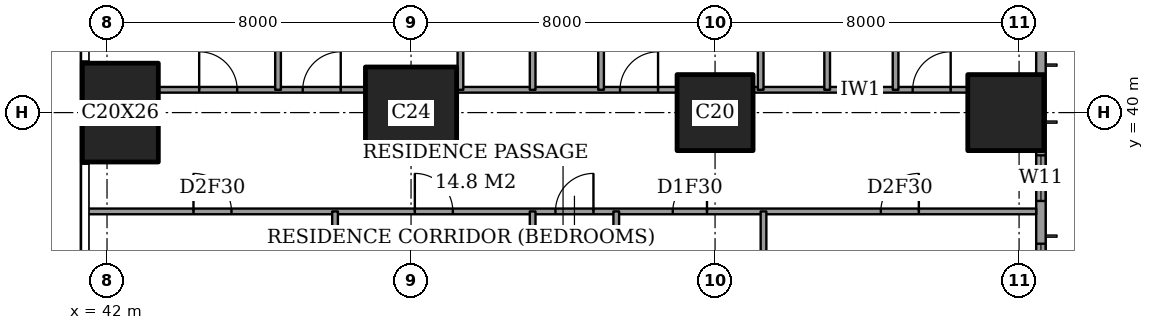
"""IFC4 building model, lengths in metres.
Left out: names, types, materials, properties, quantities, classifications, styles, units other than length and angle.
Written with IfcOpenShell. Run it as: python <this file> out.ifc"""

import sys

from ifc_helpers import new_model, si_unit, direction, frame, frame_2d, origin, origin_2d, place, context, subcontext, project, spatial, rectangle, extrude, element, fill, save


model = new_model("IFC4")
c1 = context("Model", 3, precision=1e-05, world=origin(), true_north=direction((0.0, 1.0)))
c2 = subcontext(c1, "Body", "Model", "MODEL_VIEW")
j1 = project(units=[si_unit("LENGTHUNIT", "METRE"), si_unit("PLANEANGLEUNIT", "RADIAN")], contexts=[c1])
p1 = place(None, origin())
s1 = spatial("IfcSite", under=j1, at=p1, CompositionType="ELEMENT")
p2 = place(p1, origin())
s2 = spatial("IfcBuilding", under=s1, at=p2, CompositionType="ELEMENT")
p3 = place(p2, frame((0.0, 0.0, 135.8)))
s3 = spatial("IfcBuildingStorey", under=s2, at=p3, CompositionType="ELEMENT", Elevation=135.8)
p4 = place(p3, frame((42.35, 40.0, 0.0), z_axis=(0.0, 0.0, 1.0), x_axis=(1.0, 0.0, 0.0)))
e1 = element("IfcColumn", 1, at=p4, inside=s3, PredefinedType="COLUMN", context=c2, shape_type="SweptSolid", body=[
    extrude(rectangle(XDim=2.0, YDim=2.6, at=origin_2d()), origin(), (0.0, 0.0, 1.0), 3.6),
])
p5 = place(p3, frame((50.0, 40.0, 0.0), z_axis=(0.0, 0.0, 1.0), x_axis=(1.0, 0.0, 0.0)))
e2 = element("IfcColumn", 2, at=p5, inside=s3, PredefinedType="COLUMN", context=c2, shape_type="SweptSolid", body=[
    extrude(rectangle(XDim=2.4, YDim=2.4, at=origin_2d()), origin(), (0.0, 0.0, 1.0), 3.6),
])
for number, where, z_axis, x_axis in (
    (3, (58.0, 40.0, 0.0), (0.0, 0.0, 1.0), (1.0, 0.0, 0.0)),
    (4, (65.65, 40.0, 0.0), (0.0, 0.0, 1.0), (1.0, 0.0, 0.0)),
):
    element("IfcColumn", number, at=place(p3, frame(where, z_axis=z_axis, x_axis=x_axis)), inside=s3, PredefinedType="COLUMN", context=c2, shape_type="SweptSolid", body=[
        extrude(rectangle(XDim=2.0, YDim=2.0, at=origin_2d()), origin(), (0.0, 0.0, 1.0), 3.6),
    ])
p6 = place(p3, frame((66.575, 3.175, 0.0), z_axis=(0.0, 0.0, 1.0), x_axis=(0.0, 1.0, 0.0)))
e5 = element("IfcWall", 5, at=p6, inside=s3, PredefinedType="SOLIDWALL", context=c2, shape_type="SweptSolid", body=[
    extrude(rectangle(XDim=41.65, YDim=0.25, at=frame_2d((20.825, 0.0))), origin(), (0.0, 0.0, 1.0), 3.6),
])
p7 = place(p6, frame((0.775, 0.0, 0.4)))
e6 = element("IfcOpeningElement", 6, at=p7, cuts=e5, PredefinedType="OPENING", context=c2, shape_type="SweptSolid", body=[
    extrude(rectangle(XDim=2.4, YDim=2.2, at=frame_2d((1.2, 1.1))), frame((0.0, 0.135, 0.0), z_axis=(0.0, -1.0, 0.0), x_axis=(1.0, 0.0, 0.0)), (0.0, 0.0, 1.0), 0.27),
])
p8 = place(p6, frame((6.1, 0.0, 0.4)))
e7 = element("IfcOpeningElement", 7, at=p8, cuts=e5, PredefinedType="OPENING", context=c2, shape_type="SweptSolid", body=[
    extrude(rectangle(XDim=1.2, YDim=2.2, at=frame_2d((0.6, 1.1))), frame((0.0, 0.135, 0.0), z_axis=(0.0, -1.0, 0.0), x_axis=(1.0, 0.0, 0.0)), (0.0, 0.0, 1.0), 0.27),
])
p9 = place(p6, frame((8.275, 0.0, 0.4)))
e8 = element("IfcOpeningElement", 8, at=p9, cuts=e5, PredefinedType="OPENING", context=c2, shape_type="SweptSolid", body=[
    extrude(rectangle(XDim=2.4, YDim=2.2, at=frame_2d((1.2, 1.1))), frame((0.0, 0.135, 0.0), z_axis=(0.0, -1.0, 0.0), x_axis=(1.0, 0.0, 0.0)), (0.0, 0.0, 1.0), 0.27),
])
p10 = place(p6, frame((15.775, 0.0, 0.4)))
e9 = element("IfcOpeningElement", 9, at=p10, cuts=e5, PredefinedType="OPENING", context=c2, shape_type="SweptSolid", body=[
    extrude(rectangle(XDim=2.4, YDim=2.2, at=frame_2d((1.2, 1.1))), frame((0.0, 0.135, 0.0), z_axis=(0.0, -1.0, 0.0), x_axis=(1.0, 0.0, 0.0)), (0.0, 0.0, 1.0), 0.27),
])
p11 = place(p6, frame((23.475, 0.0, 0.4)))
e10 = element("IfcOpeningElement", 10, at=p11, cuts=e5, PredefinedType="OPENING", context=c2, shape_type="SweptSolid", body=[
    extrude(rectangle(XDim=2.4, YDim=2.2, at=frame_2d((1.2, 1.1))), frame((0.0, 0.135, 0.0), z_axis=(0.0, -1.0, 0.0), x_axis=(1.0, 0.0, 0.0)), (0.0, 0.0, 1.0), 0.27),
])
p12 = place(p6, frame((30.975, 0.0, 0.4)))
e11 = element("IfcOpeningElement", 11, at=p12, cuts=e5, PredefinedType="OPENING", context=c2, shape_type="SweptSolid", body=[
    extrude(rectangle(XDim=2.4, YDim=2.2, at=frame_2d((1.2, 1.1))), frame((0.0, 0.135, 0.0), z_axis=(0.0, -1.0, 0.0), x_axis=(1.0, 0.0, 0.0)), (0.0, 0.0, 1.0), 0.27),
])
p13 = place(p6, frame((34.5, 0.0, 0.4)))
e12 = element("IfcOpeningElement", 12, at=p13, cuts=e5, PredefinedType="OPENING", context=c2, shape_type="SweptSolid", body=[
    extrude(rectangle(XDim=1.2, YDim=2.2, at=frame_2d((0.6, 1.1))), frame((0.0, 0.135, 0.0), z_axis=(0.0, -1.0, 0.0), x_axis=(1.0, 0.0, 0.0)), (0.0, 0.0, 1.0), 0.27),
])
p14 = place(p6, frame((38.475, 0.0, 0.4)))
e13 = element("IfcOpeningElement", 13, at=p14, cuts=e5, PredefinedType="OPENING", context=c2, shape_type="SweptSolid", body=[
    extrude(rectangle(XDim=2.4, YDim=2.2, at=frame_2d((1.2, 1.1))), frame((0.0, 0.135, 0.0), z_axis=(0.0, -1.0, 0.0), x_axis=(1.0, 0.0, 0.0)), (0.0, 0.0, 1.0), 0.27),
])
p15 = place(p3, frame((41.439, 37.4, 0.0), z_axis=(0.0, 0.0, 1.0), x_axis=(1.0, 0.0, 0.0)))
e14 = element("IfcWall", 14, at=p15, inside=s3, PredefinedType="PARTITIONING", context=c2, shape_type="SweptSolid", body=[
    extrude(rectangle(XDim=25.011, YDim=0.15, at=frame_2d((12.505, 0.0))), origin(), (0.0, 0.0, 1.0), 3.35),
])
p16 = place(p15, frame((12.361, 0.0, 0.0)))
e15 = element("IfcOpeningElement", 15, at=p16, cuts=e14, PredefinedType="OPENING", context=c2, shape_type="SweptSolid", body=[
    extrude(rectangle(XDim=1.0, YDim=2.1, at=frame_2d((0.5, 1.05))), frame((0.0, 0.085, 0.0), z_axis=(0.0, -1.0, 0.0), x_axis=(1.0, 0.0, 0.0)), (0.0, 0.0, 1.0), 0.17),
])
p17 = place(p15, frame((20.924, 0.0, 0.0)))
e16 = element("IfcOpeningElement", 16, at=p17, cuts=e14, PredefinedType="OPENING", context=c2, shape_type="SweptSolid", body=[
    extrude(rectangle(XDim=1.0, YDim=2.1, at=frame_2d((0.5, 1.05))), frame((0.0, 0.085, 0.0), z_axis=(0.0, -1.0, 0.0), x_axis=(1.0, 0.0, 0.0)), (0.0, 0.0, 1.0), 0.17),
])
p18 = place(p15, frame((15.448, 0.0, 0.0)))
e17 = element("IfcOpeningElement", 17, at=p18, cuts=e14, PredefinedType="OPENING", context=c2, shape_type="SweptSolid", body=[
    extrude(rectangle(XDim=0.9, YDim=2.1, at=frame_2d((0.45, 1.05))), frame((0.0, 0.085, 0.0), z_axis=(0.0, -1.0, 0.0), x_axis=(1.0, 0.0, 0.0)), (0.0, 0.0, 1.0), 0.17),
])
p19 = place(p15, frame((8.661, 0.0, 0.0)))
e18 = element("IfcOpeningElement", 18, at=p19, cuts=e14, PredefinedType="OPENING", context=c2, shape_type="SweptSolid", body=[
    extrude(rectangle(XDim=1.0, YDim=2.1, at=frame_2d((0.5, 1.05))), frame((0.0, 0.085, 0.0), z_axis=(0.0, -1.0, 0.0), x_axis=(1.0, 0.0, 0.0)), (0.0, 0.0, 1.0), 0.17),
])
p20 = place(p15, frame((2.836, 0.0, 0.0)))
e19 = element("IfcOpeningElement", 19, at=p20, cuts=e14, PredefinedType="OPENING", context=c2, shape_type="SweptSolid", body=[
    extrude(rectangle(XDim=1.0, YDim=2.1, at=frame_2d((0.5, 1.05))), frame((0.0, 0.085, 0.0), z_axis=(0.0, -1.0, 0.0), x_axis=(1.0, 0.0, 0.0)), (0.0, 0.0, 1.0), 0.17),
])
p21 = place(p3, frame((43.35, 40.6, 0.0), z_axis=(0.0, 0.0, 1.0), x_axis=(1.0, 0.0, 0.0)))
e20 = element("IfcWall", 20, at=p21, inside=s3, PredefinedType="PARTITIONING", context=c2, shape_type="SweptSolid", body=[
    extrude(rectangle(XDim=5.45, YDim=0.15, at=frame_2d((2.725, 0.0))), origin(), (0.0, 0.0, 1.0), 3.35),
])
p22 = place(p21, frame((3.8, 0.0, 0.0)))
e21 = element("IfcOpeningElement", 21, at=p22, cuts=e20, PredefinedType="OPENING", context=c2, shape_type="SweptSolid", body=[
    extrude(rectangle(XDim=1.0, YDim=2.1, at=frame_2d((0.5, 1.05))), frame((0.0, 0.085, 0.0), z_axis=(0.0, -1.0, 0.0), x_axis=(1.0, 0.0, 0.0)), (0.0, 0.0, 1.0), 0.17),
])
p23 = place(p21, frame((1.075, 0.0, 0.0)))
e22 = element("IfcOpeningElement", 22, at=p23, cuts=e20, PredefinedType="OPENING", context=c2, shape_type="SweptSolid", body=[
    extrude(rectangle(XDim=1.0, YDim=2.1, at=frame_2d((0.5, 1.05))), frame((0.0, 0.085, 0.0), z_axis=(0.0, -1.0, 0.0), x_axis=(1.0, 0.0, 0.0)), (0.0, 0.0, 1.0), 0.17),
])
p24 = place(p3, frame((51.2, 40.6, 0.0), z_axis=(0.0, 0.0, 1.0), x_axis=(1.0, 0.0, 0.0)))
e23 = element("IfcWall", 23, at=p24, inside=s3, PredefinedType="PARTITIONING", context=c2, shape_type="SweptSolid", body=[
    extrude(rectangle(XDim=5.8, YDim=0.15, at=frame_2d((2.9, 0.0))), origin(), (0.0, 0.0, 1.0), 3.35),
])
p25 = place(p24, frame((4.3, 0.0, 0.0)))
e24 = element("IfcOpeningElement", 24, at=p25, cuts=e23, PredefinedType="OPENING", context=c2, shape_type="SweptSolid", body=[
    extrude(rectangle(XDim=1.0, YDim=2.1, at=frame_2d((0.5, 1.05))), frame((0.0, 0.085, 0.0), z_axis=(0.0, -1.0, 0.0), x_axis=(1.0, 0.0, 0.0)), (0.0, 0.0, 1.0), 0.17),
])
p26 = place(p3, frame((59.0, 40.6, 0.0), z_axis=(0.0, 0.0, 1.0), x_axis=(1.0, 0.0, 0.0)))
e25 = element("IfcWall", 25, at=p26, inside=s3, PredefinedType="PARTITIONING", context=c2, shape_type="SweptSolid", body=[
    extrude(rectangle(XDim=5.65, YDim=0.15, at=frame_2d((2.825, 0.0))), origin(), (0.0, 0.0, 1.0), 3.35),
])
p27 = place(p26, frame((4.2, 0.0, 0.0)))
e26 = element("IfcOpeningElement", 26, at=p27, cuts=e25, PredefinedType="OPENING", context=c2, shape_type="SweptSolid", body=[
    extrude(rectangle(XDim=1.0, YDim=2.1, at=frame_2d((0.5, 1.05))), frame((0.0, 0.085, 0.0), z_axis=(0.0, -1.0, 0.0), x_axis=(1.0, 0.0, 0.0)), (0.0, 0.0, 1.0), 0.17),
])
p28 = place(p3, frame((46.5, 40.6, 0.0), z_axis=(0.0, 0.0, 1.0), x_axis=(0.0, 1.0, 0.0)))
e27 = element("IfcWall", 27, at=p28, inside=s3, PredefinedType="PARTITIONING", context=c2, shape_type="SweptSolid", body=[
    extrude(rectangle(XDim=7.85, YDim=0.15, at=frame_2d((3.925, 0.0))), origin(), (0.0, 0.0, 1.0), 3.35),
])
p29 = place(p3, frame((48.0, 28.0, 0.0), z_axis=(0.0, 0.0, 1.0), x_axis=(0.0, 1.0, 0.0)))
e28 = element("IfcWall", 28, at=p29, inside=s3, PredefinedType="PARTITIONING", context=c2, shape_type="SweptSolid", body=[
    extrude(rectangle(XDim=9.4, YDim=0.15, at=frame_2d((4.7, 0.0))), origin(), (0.0, 0.0, 1.0), 3.35),
])
p30 = place(p29, frame((0.837, 0.0, 0.0)))
e29 = element("IfcOpeningElement", 29, at=p30, cuts=e28, PredefinedType="OPENING", context=c2, shape_type="SweptSolid", body=[
    extrude(rectangle(XDim=1.0, YDim=2.1, at=frame_2d((0.5, 1.05))), frame((0.0, 0.085, 0.0), z_axis=(0.0, -1.0, 0.0), x_axis=(1.0, 0.0, 0.0)), (0.0, 0.0, 1.0), 0.17),
])
p31 = place(p3, frame((51.3, 40.6, 0.0), z_axis=(0.0, 0.0, 1.0), x_axis=(0.0, 1.0, 0.0)))
e30 = element("IfcWall", 30, at=p31, inside=s3, PredefinedType="PARTITIONING", context=c2, shape_type="SweptSolid", body=[
    extrude(rectangle(XDim=7.85, YDim=0.15, at=frame_2d((3.925, 0.0))), origin(), (0.0, 0.0, 1.0), 3.35),
])
p32 = place(p31, frame((3.475, 0.0, 0.0)))
e31 = element("IfcOpeningElement", 31, at=p32, cuts=e30, PredefinedType="OPENING", context=c2, shape_type="SweptSolid", body=[
    extrude(rectangle(XDim=0.9, YDim=2.1, at=frame_2d((0.45, 1.05))), frame((0.0, 0.085, 0.0), z_axis=(0.0, -1.0, 0.0), x_axis=(1.0, 0.0, 0.0)), (0.0, 0.0, 1.0), 0.17),
])
p33 = place(p3, frame((53.2, 30.675, 0.0), z_axis=(0.0, 0.0, 1.0), x_axis=(0.0, 1.0, 0.0)))
e32 = element("IfcWall", 32, at=p33, inside=s3, PredefinedType="PARTITIONING", context=c2, shape_type="SweptSolid", body=[
    extrude(rectangle(XDim=6.725, YDim=0.15, at=frame_2d((3.362, 0.0))), origin(), (0.0, 0.0, 1.0), 3.35),
])
p34 = place(p3, frame((53.2, 40.6, 0.0), z_axis=(0.0, 0.0, 1.0), x_axis=(0.0, 1.0, 0.0)))
e33 = element("IfcWall", 33, at=p34, inside=s3, PredefinedType="PARTITIONING", context=c2, shape_type="SweptSolid", body=[
    extrude(rectangle(XDim=7.85, YDim=0.15, at=frame_2d((3.925, 0.0))), origin(), (0.0, 0.0, 1.0), 3.35),
])
p35 = place(p3, frame((55.0, 40.6, 0.0), z_axis=(0.0, 0.0, 1.0), x_axis=(0.0, 1.0, 0.0)))
e34 = element("IfcWall", 34, at=p35, inside=s3, PredefinedType="PARTITIONING", context=c2, shape_type="SweptSolid", body=[
    extrude(rectangle(XDim=7.85, YDim=0.15, at=frame_2d((3.925, 0.0))), origin(), (0.0, 0.0, 1.0), 3.35),
])
p36 = place(p35, frame((3.475, 0.0, 0.0)))
e35 = element("IfcOpeningElement", 35, at=p36, cuts=e34, PredefinedType="OPENING", context=c2, shape_type="SweptSolid", body=[
    extrude(rectangle(XDim=0.9, YDim=2.1, at=frame_2d((0.45, 1.05))), frame((0.0, 0.085, 0.0), z_axis=(0.0, -1.0, 0.0), x_axis=(1.0, 0.0, 0.0)), (0.0, 0.0, 1.0), 0.17),
])
p37 = place(p3, frame((55.4, 28.0, 0.0), z_axis=(0.0, 0.0, 1.0), x_axis=(0.0, 1.0, 0.0)))
e36 = element("IfcWall", 36, at=p37, inside=s3, PredefinedType="PARTITIONING", context=c2, shape_type="SweptSolid", body=[
    extrude(rectangle(XDim=9.4, YDim=0.15, at=frame_2d((4.7, 0.0))), origin(), (0.0, 0.0, 1.0), 3.35),
])
p38 = place(p37, frame((0.837, 0.0, 0.0)))
e37 = element("IfcOpeningElement", 37, at=p38, cuts=e36, PredefinedType="OPENING", context=c2, shape_type="SweptSolid", body=[
    extrude(rectangle(XDim=1.0, YDim=2.1, at=frame_2d((0.5, 1.05))), frame((0.0, 0.085, 0.0), z_axis=(0.0, -1.0, 0.0), x_axis=(1.0, 0.0, 0.0)), (0.0, 0.0, 1.0), 0.17),
])
p39 = place(p3, frame((59.2, 40.6, 0.0), z_axis=(0.0, 0.0, 1.0), x_axis=(0.0, 1.0, 0.0)))
e38 = element("IfcWall", 38, at=p39, inside=s3, PredefinedType="PARTITIONING", context=c2, shape_type="SweptSolid", body=[
    extrude(rectangle(XDim=7.85, YDim=0.15, at=frame_2d((3.925, 0.0))), origin(), (0.0, 0.0, 1.0), 3.35),
])
p40 = place(p3, frame((59.275, 33.2, 0.0), z_axis=(0.0, 0.0, 1.0), x_axis=(0.0, 1.0, 0.0)))
e39 = element("IfcWall", 39, at=p40, inside=s3, PredefinedType="PARTITIONING", context=c2, shape_type="SweptSolid", body=[
    extrude(rectangle(XDim=4.2, YDim=0.15, at=frame_2d((2.1, 0.0))), origin(), (0.0, 0.0, 1.0), 3.35),
])
p41 = place(p3, frame((60.95, 40.6, 0.0), z_axis=(0.0, 0.0, 1.0), x_axis=(0.0, 1.0, 0.0)))
e40 = element("IfcWall", 40, at=p41, inside=s3, PredefinedType="PARTITIONING", context=c2, shape_type="SweptSolid", body=[
    extrude(rectangle(XDim=7.85, YDim=0.15, at=frame_2d((3.925, 0.0))), origin(), (0.0, 0.0, 1.0), 3.35),
])
p42 = place(p41, frame((5.225, 0.0, 0.0)))
e41 = element("IfcOpeningElement", 41, at=p42, cuts=e40, PredefinedType="OPENING", context=c2, shape_type="SweptSolid", body=[
    extrude(rectangle(XDim=0.9, YDim=2.1, at=frame_2d((0.45, 1.05))), frame((0.0, 0.085, 0.0), z_axis=(0.0, -1.0, 0.0), x_axis=(1.0, 0.0, 0.0)), (0.0, 0.0, 1.0), 0.17),
])
p43 = place(p3, frame((62.75, 40.6, 0.0), z_axis=(0.0, 0.0, 1.0), x_axis=(0.0, 1.0, 0.0)))
e42 = element("IfcWall", 42, at=p43, inside=s3, PredefinedType="PARTITIONING", context=c2, shape_type="SweptSolid", body=[
    extrude(rectangle(XDim=3.5, YDim=0.15, at=frame_2d((1.75, 0.0))), origin(), (0.0, 0.0, 1.0), 3.35),
])
p44 = place(p43, frame((1.3, 0.0, 0.0)))
e43 = element("IfcOpeningElement", 43, at=p44, cuts=e42, PredefinedType="OPENING", context=c2, shape_type="SweptSolid", body=[
    extrude(rectangle(XDim=0.9, YDim=2.1, at=frame_2d((0.45, 1.05))), frame((0.0, 0.085, 0.0), z_axis=(0.0, -1.0, 0.0), x_axis=(1.0, 0.0, 0.0)), (0.0, 0.0, 1.0), 0.17),
])
p45 = place(p12, origin())
e44 = element("IfcWindow", 44, at=p45, inside=s3, PartitioningType="SINGLE_PANEL", PredefinedType="WINDOW", context=c2, shape_type="SweptSolid", body=[
    extrude(rectangle(XDim=2.4, YDim=2.2, at=frame_2d((1.2, 1.1))), frame((0.0, 0.03, 0.0), z_axis=(0.0, -1.0, 0.0), x_axis=(1.0, 0.0, 0.0)), (0.0, 0.0, 1.0), 0.06),
])
fill(e11, e44)
p46 = place(p13, origin())
e45 = element("IfcWindow", 45, at=p46, inside=s3, PartitioningType="SINGLE_PANEL", PredefinedType="WINDOW", context=c2, shape_type="SweptSolid", body=[
    extrude(rectangle(XDim=1.2, YDim=2.2, at=frame_2d((0.6, 1.1))), frame((0.0, 0.03, 0.0), z_axis=(0.0, -1.0, 0.0), x_axis=(1.0, 0.0, 0.0)), (0.0, 0.0, 1.0), 0.06),
])
fill(e12, e45)
p47 = place(p27, origin())
e46 = element("IfcDoor", 46, at=p47, inside=s3, OperationType="SINGLE_SWING_LEFT", PredefinedType="DOOR", context=c2, shape_type="SweptSolid", body=[
    extrude(rectangle(XDim=1.0, YDim=2.1, at=frame_2d((0.5, 1.05))), frame((0.0, 0.025, 0.0), z_axis=(0.0, -1.0, 0.0), x_axis=(1.0, 0.0, 0.0)), (0.0, 0.0, 1.0), 0.05),
])
fill(e26, e46)
p48 = place(p25, origin())
e47 = element("IfcDoor", 47, at=p48, inside=s3, OperationType="SINGLE_SWING_LEFT", PredefinedType="DOOR", context=c2, shape_type="SweptSolid", body=[
    extrude(rectangle(XDim=1.0, YDim=2.1, at=frame_2d((0.5, 1.05))), frame((0.0, 0.025, 0.0), z_axis=(0.0, -1.0, 0.0), x_axis=(1.0, 0.0, 0.0)), (0.0, 0.0, 1.0), 0.05),
])
fill(e24, e47)
p49 = place(p22, origin())
e48 = element("IfcDoor", 48, at=p49, inside=s3, OperationType="SINGLE_SWING_LEFT", PredefinedType="DOOR", context=c2, shape_type="SweptSolid", body=[
    extrude(rectangle(XDim=1.0, YDim=2.1, at=frame_2d((0.5, 1.05))), frame((0.0, 0.025, 0.0), z_axis=(0.0, -1.0, 0.0), x_axis=(1.0, 0.0, 0.0)), (0.0, 0.0, 1.0), 0.05),
])
fill(e21, e48)
p50 = place(p23, origin())
e49 = element("IfcDoor", 49, at=p50, inside=s3, OperationType="SINGLE_SWING_RIGHT", PredefinedType="DOOR", context=c2, shape_type="SweptSolid", body=[
    extrude(rectangle(XDim=1.0, YDim=2.1, at=frame_2d((0.5, 1.05))), frame((0.0, 0.025, 0.0), z_axis=(0.0, -1.0, 0.0), x_axis=(1.0, 0.0, 0.0)), (0.0, 0.0, 1.0), 0.05),
])
fill(e22, e49)
p51 = place(p16, origin())
e50 = element("IfcDoor", 50, at=p51, inside=s3, OperationType="SINGLE_SWING_LEFT", PredefinedType="DOOR", context=c2, shape_type="SweptSolid", body=[
    extrude(rectangle(XDim=1.0, YDim=2.1, at=frame_2d((0.5, 1.05))), frame((0.0, 0.025, 0.0), z_axis=(0.0, -1.0, 0.0), x_axis=(1.0, 0.0, 0.0)), (0.0, 0.0, 1.0), 0.05),
])
fill(e15, e50)
p52 = place(p17, origin())
e51 = element("IfcDoor", 51, at=p52, inside=s3, OperationType="SINGLE_SWING_LEFT", PredefinedType="DOOR", context=c2, shape_type="SweptSolid", body=[
    extrude(rectangle(XDim=1.0, YDim=2.1, at=frame_2d((0.5, 1.05))), frame((0.0, 0.025, 0.0), z_axis=(0.0, -1.0, 0.0), x_axis=(1.0, 0.0, 0.0)), (0.0, 0.0, 1.0), 0.05),
])
fill(e16, e51)
p53 = place(p18, origin())
e52 = element("IfcDoor", 52, at=p53, inside=s3, OperationType="SINGLE_SWING_LEFT", PredefinedType="DOOR", context=c2, shape_type="SweptSolid", body=[
    extrude(rectangle(XDim=0.9, YDim=2.1, at=frame_2d((0.45, 1.05))), frame((0.0, 0.025, 0.0), z_axis=(0.0, -1.0, 0.0), x_axis=(1.0, 0.0, 0.0)), (0.0, 0.0, 1.0), 0.05),
])
fill(e17, e52)
p54 = place(p19, origin())
e53 = element("IfcDoor", 53, at=p54, inside=s3, OperationType="SINGLE_SWING_RIGHT", PredefinedType="DOOR", context=c2, shape_type="SweptSolid", body=[
    extrude(rectangle(XDim=1.0, YDim=2.1, at=frame_2d((0.5, 1.05))), frame((0.0, 0.025, 0.0), z_axis=(0.0, -1.0, 0.0), x_axis=(1.0, 0.0, 0.0)), (0.0, 0.0, 1.0), 0.05),
])
fill(e18, e53)
p55 = place(p20, origin())
e54 = element("IfcDoor", 54, at=p55, inside=s3, OperationType="SINGLE_SWING_RIGHT", PredefinedType="DOOR", context=c2, shape_type="SweptSolid", body=[
    extrude(rectangle(XDim=1.0, YDim=2.1, at=frame_2d((0.5, 1.05))), frame((0.0, 0.025, 0.0), z_axis=(0.0, -1.0, 0.0), x_axis=(1.0, 0.0, 0.0)), (0.0, 0.0, 1.0), 0.05),
])
fill(e19, e54)
save(model, sys.argv[1])
